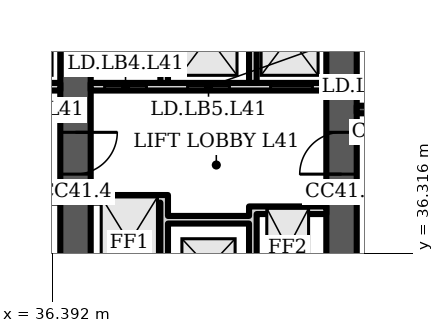
"""IFC4 building model, lengths in metres.
Left out: names, types, materials, properties, quantities, classifications, styles, units other than length and angle.
Written with IfcOpenShell. Run it as: python <this file> out.ifc"""

import sys

from ifc_helpers import new_model, si_unit, direction, frame, frame_2d, origin, place, context, subcontext, project, spatial, polyline, rectangle, outline, extrude, element, fill, save


model = new_model("IFC4")
c1 = context("Model", 3, precision=1e-05, world=origin(), true_north=direction((0.0, 1.0)))
c2 = subcontext(c1, "Body", "Model", "MODEL_VIEW")
j1 = project(units=[si_unit("LENGTHUNIT", "METRE"), si_unit("PLANEANGLEUNIT", "RADIAN")], contexts=[c1])
p1 = place(None, origin())
s1 = spatial("IfcSite", under=j1, at=p1, CompositionType="ELEMENT")
p2 = place(p1, origin())
s2 = spatial("IfcBuilding", under=s1, at=p2, CompositionType="ELEMENT")
p3 = place(p2, frame((0.0, 0.0, 169.9)))
s3 = spatial("IfcBuildingStorey", under=s2, at=p3, CompositionType="ELEMENT", Elevation=169.9)
p4 = place(p3, frame((37.0, 34.8, 0.0), z_axis=(0.0, 0.0, 1.0), x_axis=(0.0, 1.0, 0.0)))
e1 = element("IfcWall", 1, at=p4, inside=s3, PredefinedType="SHEAR", context=c2, shape_type="SweptSolid", body=[
    extrude(rectangle(XDim=14.987, YDim=0.8, at=frame_2d((7.493, 0.0))), origin(), (0.0, 0.0, 1.0), 3.6),
])
p5 = place(p4, frame((11.312, 0.0, 0.0)))
e2 = element("IfcOpeningElement", 2, at=p5, cuts=e1, PredefinedType="OPENING", context=c2, shape_type="SweptSolid", body=[
    extrude(rectangle(XDim=1.0, YDim=2.1, at=frame_2d((0.5, 1.05))), frame((0.0, 0.41, 0.0), z_axis=(0.0, -1.0, 0.0), x_axis=(1.0, 0.0, 0.0)), (0.0, 0.0, 1.0), 0.82),
])
p6 = place(p4, frame((3.6, 0.0, 0.0)))
e3 = element("IfcOpeningElement", 3, at=p6, cuts=e1, PredefinedType="OPENING", context=c2, shape_type="SweptSolid", body=[
    extrude(rectangle(XDim=1.1, YDim=2.1, at=frame_2d((0.55, 1.05))), frame((0.0, 0.41, 0.0), z_axis=(0.0, -1.0, 0.0), x_axis=(1.0, 0.0, 0.0)), (0.0, 0.0, 1.0), 0.82),
])
p7 = place(p3, frame((44.0, 34.8, 0.0), z_axis=(0.0, 0.0, 1.0), x_axis=(0.0, 1.0, 0.0)))
e4 = element("IfcWall", 4, at=p7, inside=s3, PredefinedType="SHEAR", context=c2, shape_type="SweptSolid", body=[
    extrude(rectangle(XDim=14.374, YDim=0.8, at=frame_2d((7.187, 0.0))), origin(), (0.0, 0.0, 1.0), 3.6),
])
p8 = place(p7, frame((11.312, 0.0, 0.0)))
e5 = element("IfcOpeningElement", 5, at=p8, cuts=e4, PredefinedType="OPENING", context=c2, shape_type="SweptSolid", body=[
    extrude(rectangle(XDim=1.0, YDim=2.1, at=frame_2d((0.5, 1.05))), frame((0.0, 0.41, 0.0), z_axis=(0.0, -1.0, 0.0), x_axis=(1.0, 0.0, 0.0)), (0.0, 0.0, 1.0), 0.82),
])
p9 = place(p7, frame((3.6, 0.0, 0.0)))
e6 = element("IfcOpeningElement", 6, at=p9, cuts=e4, PredefinedType="OPENING", context=c2, shape_type="SweptSolid", body=[
    extrude(rectangle(XDim=1.1, YDim=2.1, at=frame_2d((0.55, 1.05))), frame((0.0, 0.41, 0.0), z_axis=(0.0, -1.0, 0.0), x_axis=(1.0, 0.0, 0.0)), (0.0, 0.0, 1.0), 0.82),
])
p10 = place(p3, frame((30.4, 40.7, 0.0), z_axis=(0.0, 0.0, 1.0), x_axis=(1.0, 0.0, 0.0)))
e7 = element("IfcWall", 7, at=p10, inside=s3, PredefinedType="PARTITIONING", context=c2, shape_type="SweptSolid", body=[
    extrude(rectangle(XDim=6.2, YDim=0.2, at=frame_2d((3.1, 0.0))), origin(), (0.0, 0.0, 1.0), 3.2),
])
p11 = place(p10, frame((0.367, 0.0, 0.0)))
e8 = element("IfcOpeningElement", 8, at=p11, cuts=e7, PredefinedType="OPENING", context=c2, shape_type="SweptSolid", body=[
    extrude(rectangle(XDim=1.1, YDim=2.1, at=frame_2d((0.55, 1.05))), frame((0.0, 0.11, 0.0), z_axis=(0.0, -1.0, 0.0), x_axis=(1.0, 0.0, 0.0)), (0.0, 0.0, 1.0), 0.22),
])
p12 = place(p10, frame((2.55, 0.0, 0.0)))
e9 = element("IfcOpeningElement", 9, at=p12, cuts=e7, PredefinedType="OPENING", context=c2, shape_type="SweptSolid", body=[
    extrude(rectangle(XDim=1.1, YDim=2.1, at=frame_2d((0.55, 1.05))), frame((0.0, 0.11, 0.0), z_axis=(0.0, -1.0, 0.0), x_axis=(1.0, 0.0, 0.0)), (0.0, 0.0, 1.0), 0.22),
])
p13 = place(p10, frame((4.733, 0.0, 0.0)))
e10 = element("IfcOpeningElement", 10, at=p13, cuts=e7, PredefinedType="OPENING", context=c2, shape_type="SweptSolid", body=[
    extrude(rectangle(XDim=1.1, YDim=2.1, at=frame_2d((0.55, 1.05))), frame((0.0, 0.11, 0.0), z_axis=(0.0, -1.0, 0.0), x_axis=(1.0, 0.0, 0.0)), (0.0, 0.0, 1.0), 0.22),
])
p14 = place(p3, origin())
e11 = element("IfcWall", 11, at=p14, inside=s3, PredefinedType="PARTITIONING", context=c2, shape_type="SweptSolid", body=[
    extrude(outline(polyline([(34.567, 37.85), (34.767, 37.85), (36.6, 37.85), (36.6, 37.65), (34.767, 37.65), (34.767, 34.8), (34.567, 34.8), (34.567, 37.85)])), origin(), (0.0, 0.0, 1.0), 3.2),
])
p15 = place(p3, origin())
e12 = element("IfcWall", 12, at=p15, inside=s3, PredefinedType="PARTITIONING", context=c2, shape_type="SweptSolid", body=[
    extrude(outline(polyline([(32.433, 40.8), (32.233, 40.8), (32.233, 43.8), (30.4, 43.8), (30.4, 44.0), (36.6, 44.0), (36.6, 43.8), (34.767, 43.8), (34.767, 40.8), (34.567, 40.8), (34.567, 43.8), (32.433, 43.8), (32.433, 40.8)])), origin(), (0.0, 0.0, 1.0), 3.2),
])
p16 = place(p3, frame((37.4, 40.7, 0.0), z_axis=(0.0, 0.0, 1.0), x_axis=(1.0, 0.0, 0.0)))
e13 = element("IfcWall", 13, at=p16, inside=s3, PredefinedType="PARTITIONING", context=c2, shape_type="SweptSolid", body=[
    extrude(rectangle(XDim=6.2, YDim=0.2, at=frame_2d((3.1, 0.0))), origin(), (0.0, 0.0, 1.0), 3.2),
])
p17 = place(p16, frame((0.367, 0.0, 0.0)))
e14 = element("IfcOpeningElement", 14, at=p17, cuts=e13, PredefinedType="OPENING", context=c2, shape_type="SweptSolid", body=[
    extrude(rectangle(XDim=1.1, YDim=2.1, at=frame_2d((0.55, 1.05))), frame((0.0, 0.11, 0.0), z_axis=(0.0, -1.0, 0.0), x_axis=(1.0, 0.0, 0.0)), (0.0, 0.0, 1.0), 0.22),
])
p18 = place(p16, frame((2.55, 0.0, 0.0)))
e15 = element("IfcOpeningElement", 15, at=p18, cuts=e13, PredefinedType="OPENING", context=c2, shape_type="SweptSolid", body=[
    extrude(rectangle(XDim=1.1, YDim=2.1, at=frame_2d((0.55, 1.05))), frame((0.0, 0.11, 0.0), z_axis=(0.0, -1.0, 0.0), x_axis=(1.0, 0.0, 0.0)), (0.0, 0.0, 1.0), 0.22),
])
p19 = place(p16, frame((4.733, 0.0, 0.0)))
e16 = element("IfcOpeningElement", 16, at=p19, cuts=e13, PredefinedType="OPENING", context=c2, shape_type="SweptSolid", body=[
    extrude(rectangle(XDim=1.1, YDim=2.1, at=frame_2d((0.55, 1.05))), frame((0.0, 0.11, 0.0), z_axis=(0.0, -1.0, 0.0), x_axis=(1.0, 0.0, 0.0)), (0.0, 0.0, 1.0), 0.22),
])
p20 = place(p3, origin())
e17 = element("IfcWall", 17, at=p20, inside=s3, PredefinedType="PARTITIONING", context=c2, shape_type="SweptSolid", body=[
    extrude(outline(polyline([(41.567, 37.1), (39.433, 37.1), (39.433, 34.8), (39.233, 34.8), (39.233, 37.65), (37.4, 37.65), (37.4, 37.85), (39.233, 37.85), (39.433, 37.85), (39.433, 37.3), (41.567, 37.3), (41.567, 37.55), (41.767, 37.55), (43.6, 37.55), (43.6, 37.35), (41.767, 37.35), (41.767, 34.8), (41.567, 34.8), (41.567, 37.1)])), origin(), (0.0, 0.0, 1.0), 3.2),
])
p21 = place(p3, origin())
e18 = element("IfcWall", 18, at=p21, inside=s3, PredefinedType="PARTITIONING", context=c2, shape_type="SweptSolid", body=[
    extrude(outline(polyline([(39.433, 40.8), (39.233, 40.8), (39.233, 43.8), (37.4, 43.8), (37.4, 44.0), (43.6, 44.0), (43.6, 43.8), (41.767, 43.8), (41.767, 40.8), (41.567, 40.8), (41.567, 43.8), (39.433, 43.8), (39.433, 40.8)])), origin(), (0.0, 0.0, 1.0), 3.2),
])
p22 = place(p3, frame((44.4, 40.1, 0.0), z_axis=(0.0, 0.0, 1.0), x_axis=(1.0, 0.0, 0.0)))
e19 = element("IfcWall", 19, at=p22, inside=s3, PredefinedType="SHEAR", context=c2, shape_type="SweptSolid", body=[
    extrude(rectangle(XDim=6.2, YDim=0.2, at=frame_2d((3.1, 0.0))), origin(), (0.0, 0.0, 1.0), 3.2),
])
p23 = place(p22, frame((3.525, 0.0, 0.0)))
e20 = element("IfcOpeningElement", 20, at=p23, cuts=e19, PredefinedType="OPENING", context=c2, shape_type="SweptSolid", body=[
    extrude(rectangle(XDim=1.2, YDim=2.1, at=frame_2d((0.6, 1.05))), frame((0.0, 0.11, 0.0), z_axis=(0.0, -1.0, 0.0), x_axis=(1.0, 0.0, 0.0)), (0.0, 0.0, 1.0), 0.22),
])
p24 = place(p22, frame((0.575, 0.0, 0.0)))
e21 = element("IfcOpeningElement", 21, at=p24, cuts=e19, PredefinedType="OPENING", context=c2, shape_type="SweptSolid", body=[
    extrude(rectangle(XDim=0.9, YDim=2.1, at=frame_2d((0.45, 1.05))), frame((0.0, 0.11, 0.0), z_axis=(0.0, -1.0, 0.0), x_axis=(1.0, 0.0, 0.0)), (0.0, 0.0, 1.0), 0.22),
])
p25 = place(p17, origin())
e22 = element("IfcDoor", 22, at=p25, inside=s3, OperationType="DOUBLE_DOOR_SLIDING", PredefinedType="DOOR", context=c2, shape_type="SweptSolid", body=[
    extrude(rectangle(XDim=1.1, YDim=2.1, at=frame_2d((0.55, 1.05))), frame((0.0, 0.025, 0.0), z_axis=(0.0, -1.0, 0.0), x_axis=(1.0, 0.0, 0.0)), (0.0, 0.0, 1.0), 0.05),
])
fill(e14, e22)
p26 = place(p18, origin())
e23 = element("IfcDoor", 23, at=p26, inside=s3, OperationType="DOUBLE_DOOR_SLIDING", PredefinedType="DOOR", context=c2, shape_type="SweptSolid", body=[
    extrude(rectangle(XDim=1.1, YDim=2.1, at=frame_2d((0.55, 1.05))), frame((0.0, 0.025, 0.0), z_axis=(0.0, -1.0, 0.0), x_axis=(1.0, 0.0, 0.0)), (0.0, 0.0, 1.0), 0.05),
])
fill(e15, e23)
p27 = place(p19, origin())
e24 = element("IfcDoor", 24, at=p27, inside=s3, OperationType="DOUBLE_DOOR_SLIDING", PredefinedType="DOOR", context=c2, shape_type="SweptSolid", body=[
    extrude(rectangle(XDim=1.1, YDim=2.1, at=frame_2d((0.55, 1.05))), frame((0.0, 0.025, 0.0), z_axis=(0.0, -1.0, 0.0), x_axis=(1.0, 0.0, 0.0)), (0.0, 0.0, 1.0), 0.05),
])
fill(e16, e24)
p28 = place(p6, origin())
e25 = element("IfcDoor", 25, at=p28, inside=s3, OperationType="SINGLE_SWING_RIGHT", PredefinedType="DOOR", context=c2, shape_type="SweptSolid", body=[
    extrude(rectangle(XDim=1.1, YDim=2.1, at=frame_2d((0.55, 1.05))), frame((0.0, 0.025, 0.0), z_axis=(0.0, -1.0, 0.0), x_axis=(1.0, 0.0, 0.0)), (0.0, 0.0, 1.0), 0.05),
])
fill(e3, e25)
p29 = place(p9, origin())
e26 = element("IfcDoor", 26, at=p29, inside=s3, OperationType="SINGLE_SWING_LEFT", PredefinedType="DOOR", context=c2, shape_type="SweptSolid", body=[
    extrude(rectangle(XDim=1.1, YDim=2.1, at=frame_2d((0.55, 1.05))), frame((0.0, 0.025, 0.0), z_axis=(0.0, -1.0, 0.0), x_axis=(1.0, 0.0, 0.0)), (0.0, 0.0, 1.0), 0.05),
])
fill(e6, e26)
save(model, sys.argv[1])
